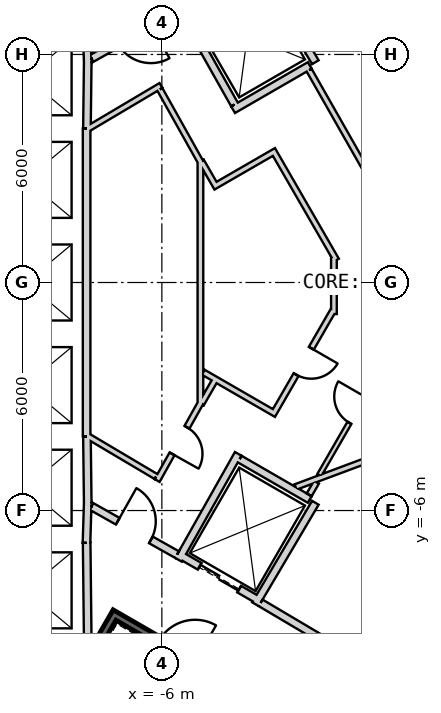
"""IFC4 building model, lengths in metres.
Left out: names, types, materials, properties, quantities, classifications, styles, units other than length and angle.
Written with IfcOpenShell. Run it as: python <this file> out.ifc"""

import sys

from ifc_helpers import new_model, si_unit, direction, frame, frame_2d, origin, place, context, subcontext, project, spatial, rectangle, extrude, element, fill, save


model = new_model("IFC4")
c1 = context("Model", 3, precision=1e-05, world=origin(), true_north=direction((0.0, 1.0)))
c2 = subcontext(c1, "Body", "Model", "MODEL_VIEW")
j1 = project(units=[si_unit("LENGTHUNIT", "METRE"), si_unit("PLANEANGLEUNIT", "RADIAN")], contexts=[c1])
p1 = place(None, origin())
s1 = spatial("IfcSite", under=j1, at=p1, CompositionType="ELEMENT")
p2 = place(p1, origin())
s2 = spatial("IfcBuilding", under=s1, at=p2, CompositionType="ELEMENT")
p3 = place(p2, frame((0.0, 0.0, 357.2)))
s3 = spatial("IfcBuildingStorey", under=s2, at=p3, CompositionType="ELEMENT", Elevation=357.2)
p4 = place(p3, frame((19.475, 2.208, 0.0), z_axis=(0.0, 0.0, 1.0), x_axis=(-0.866028369851, 0.499994862586, 0.0)))
e1 = element("IfcWall", 1, at=p4, inside=s3, PredefinedType="SHEAR", context=c2, shape_type="SweptSolid", body=[
    extrude(rectangle(XDim=31.523, YDim=0.9, at=frame_2d((15.762, 0.0))), origin(), (0.0, 0.0, 1.0), 3.9),
])
p5 = place(p4, frame((7.062, 0.0, 0.0)))
e2 = element("IfcOpeningElement", 2, at=p5, cuts=e1, PredefinedType="OPENING", context=c2, shape_type="SweptSolid", body=[
    extrude(rectangle(XDim=1.2, YDim=2.4, at=frame_2d((0.6, 1.2))), frame((0.0, 0.46, 0.0), z_axis=(0.0, -1.0, 0.0), x_axis=(1.0, 0.0, 0.0)), (0.0, 0.0, 1.0), 0.92),
])
p6 = place(p4, frame((3.612, 0.0, 0.0)))
e3 = element("IfcOpeningElement", 3, at=p6, cuts=e1, PredefinedType="OPENING", context=c2, shape_type="SweptSolid", body=[
    extrude(rectangle(XDim=1.2, YDim=2.4, at=frame_2d((0.6, 1.2))), frame((0.0, 0.46, 0.0), z_axis=(0.0, -1.0, 0.0), x_axis=(1.0, 0.0, 0.0)), (0.0, 0.0, 1.0), 0.92),
])
p7 = place(p4, frame((26.712, 0.0, 0.0)))
e4 = element("IfcOpeningElement", 4, at=p7, cuts=e1, PredefinedType="OPENING", context=c2, shape_type="SweptSolid", body=[
    extrude(rectangle(XDim=1.2, YDim=2.4, at=frame_2d((0.6, 1.2))), frame((0.0, 0.46, 0.0), z_axis=(0.0, -1.0, 0.0), x_axis=(1.0, 0.0, 0.0)), (0.0, 0.0, 1.0), 0.92),
])
p8 = place(p3, frame((-7.825, -17.97, 0.0), z_axis=(0.0, 0.0, 1.0), x_axis=(0.866028369851, 0.499994862586, 0.0)))
e5 = element("IfcWall", 5, at=p8, inside=s3, PredefinedType="SHEAR", context=c2, shape_type="SweptSolid", body=[
    extrude(rectangle(XDim=31.523, YDim=0.9, at=frame_2d((15.762, 0.0))), origin(), (0.0, 0.0, 1.0), 3.9),
])
p9 = place(p8, frame((17.862, 0.0, 0.0)))
e6 = element("IfcOpeningElement", 6, at=p9, cuts=e5, PredefinedType="OPENING", context=c2, shape_type="SweptSolid", body=[
    extrude(rectangle(XDim=1.2, YDim=2.4, at=frame_2d((0.6, 1.2))), frame((0.0, 0.46, 0.0), z_axis=(0.0, -1.0, 0.0), x_axis=(1.0, 0.0, 0.0)), (0.0, 0.0, 1.0), 0.92),
])
p10 = place(p8, frame((20.562, 0.0, 0.0)))
e7 = element("IfcOpeningElement", 7, at=p10, cuts=e5, PredefinedType="OPENING", context=c2, shape_type="SweptSolid", body=[
    extrude(rectangle(XDim=1.2, YDim=2.4, at=frame_2d((0.6, 1.2))), frame((0.0, 0.46, 0.0), z_axis=(0.0, -1.0, 0.0), x_axis=(1.0, 0.0, 0.0)), (0.0, 0.0, 1.0), 0.92),
])
p11 = place(p8, frame((26.712, 0.0, 0.0)))
e8 = element("IfcOpeningElement", 8, at=p11, cuts=e5, PredefinedType="OPENING", context=c2, shape_type="SweptSolid", body=[
    extrude(rectangle(XDim=1.2, YDim=2.4, at=frame_2d((0.6, 1.2))), frame((0.0, 0.46, 0.0), z_axis=(0.0, -1.0, 0.0), x_axis=(1.0, 0.0, 0.0)), (0.0, 0.0, 1.0), 0.92),
])
p12 = place(p8, frame((3.612, 0.0, 0.0)))
e9 = element("IfcOpeningElement", 9, at=p12, cuts=e5, PredefinedType="OPENING", context=c2, shape_type="SweptSolid", body=[
    extrude(rectangle(XDim=1.2, YDim=2.4, at=frame_2d((0.6, 1.2))), frame((0.0, 0.46, 0.0), z_axis=(0.0, -1.0, 0.0), x_axis=(1.0, 0.0, 0.0)), (0.0, 0.0, 1.0), 0.92),
])
p13 = place(p3, frame((-7.977, 6.65, 0.0), z_axis=(0.0, 0.0, 1.0), x_axis=(0.030861509705, -0.999523670164, 0.0)))
e10 = element("IfcWall", 10, at=p13, inside=s3, PredefinedType="PLUMBINGWALL", context=c2, shape_type="SweptSolid", body=[
    extrude(rectangle(XDim=0.878, YDim=0.2, at=frame_2d((0.439, 0.0))), origin(), (0.0, 0.0, 1.0), 3.6),
])
p14 = place(p3, frame((-7.949, 5.895, 0.0), z_axis=(0.0, 0.0, 1.0), x_axis=(-0.012042535896, -0.999927486035, 0.0)))
e11 = element("IfcWall", 11, at=p14, inside=s3, PredefinedType="PLUMBINGWALL", context=c2, shape_type="SweptSolid", body=[
    extrude(rectangle(XDim=1.845, YDim=0.2, at=frame_2d((0.922, 0.0))), origin(), (0.0, 0.0, 1.0), 3.6),
])
p15 = place(p3, frame((-7.98, 4.05, 0.0), z_axis=(0.0, 0.0, 1.0), x_axis=(0.0, -1.0, 0.0)))
e12 = element("IfcWall", 12, at=p15, inside=s3, PredefinedType="PLUMBINGWALL", context=c2, shape_type="SweptSolid", body=[
    extrude(rectangle(XDim=8.1, YDim=0.2, at=frame_2d((4.05, 0.0))), origin(), (0.0, 0.0, 1.0), 3.6),
])
p16 = place(p3, frame((-7.95, -5.772, 0.0), z_axis=(0.0, 0.0, 1.0), x_axis=(-0.030803413295, -0.999525462272, 0.0)))
e13 = element("IfcWall", 13, at=p16, inside=s3, PredefinedType="PLUMBINGWALL", context=c2, shape_type="SweptSolid", body=[
    extrude(rectangle(XDim=1.078, YDim=0.2, at=frame_2d((0.539, 0.0))), origin(), (0.0, 0.0, 1.0), 3.6),
])
p17 = place(p3, frame((-7.971, -4.05, 0.0), z_axis=(0.0, 0.0, 1.0), x_axis=(0.012042535896, -0.999927486035, 0.0)))
e14 = element("IfcWall", 14, at=p17, inside=s3, PredefinedType="PLUMBINGWALL", context=c2, shape_type="SweptSolid", body=[
    extrude(rectangle(XDim=1.845, YDim=0.2, at=frame_2d((0.922, 0.0))), origin(), (0.0, 0.0, 1.0), 3.6),
])
p18 = place(p3, frame((-7.979, -6.85, 0.0), z_axis=(0.0, 0.0, 1.0), x_axis=(0.011121475088, -0.999938154483, 0.0)))
e15 = element("IfcWall", 15, at=p18, inside=s3, PredefinedType="PLUMBINGWALL", context=c2, shape_type="SweptSolid", body=[
    extrude(rectangle(XDim=2.7, YDim=0.2, at=frame_2d((1.35, 0.0))), origin(), (0.0, 0.0, 1.0), 3.6),
])
p19 = place(p3, frame((-3.538, 8.465, 0.0), z_axis=(0.0, 0.0, 1.0), x_axis=(0.508647062354, -0.860975125052, 0.0)))
e16 = element("IfcWall", 16, at=p19, inside=s3, PredefinedType="PLUMBINGWALL", context=c2, shape_type="SweptSolid", body=[
    extrude(rectangle(XDim=3.1, YDim=0.2, at=frame_2d((1.55, 0.0))), origin(), (0.0, 0.0, 1.0), 3.6),
])
p20 = place(p3, frame((-1.979, 5.786, 0.0), z_axis=(0.0, 0.0, 1.0), x_axis=(-0.866016689309, -0.500015093611, 0.0)))
e17 = element("IfcWall", 17, at=p20, inside=s3, PredefinedType="PLUMBINGWALL", context=c2, shape_type="SweptSolid", body=[
    extrude(rectangle(XDim=2.479, YDim=0.2, at=frame_2d((1.24, 0.0))), origin(), (0.0, 0.0, 1.0), 3.6),
])
p21 = place(p3, frame((-5.562, 7.296, 0.0), z_axis=(0.0, 0.0, 1.0), x_axis=(0.49134651263, -0.870964180966, 0.0)))
e18 = element("IfcWall", 18, at=p21, inside=s3, PredefinedType="PLUMBINGWALL", context=c2, shape_type="SweptSolid", body=[
    extrude(rectangle(XDim=3.0, YDim=0.2, at=frame_2d((1.5, 0.0))), origin(), (0.0, 0.0, 1.0), 3.6),
])
p22 = place(p3, frame((-7.196, -8.663, -0.3), z_axis=(0.0, 0.0, 1.0), x_axis=(-0.499997992926, -0.866026562566, 0.0)))
e19 = element("IfcWall", 19, at=p22, inside=s3, PredefinedType="SHEAR", context=c2, shape_type="SweptSolid", body=[
    extrude(rectangle(XDim=7.9, YDim=0.2, at=frame_2d((3.95, 0.0))), origin(), (0.0, 0.0, 1.0), 3.9),
])
p23 = place(p3, frame((-4.041, -10.599, -0.3), z_axis=(0.0, 0.0, 1.0), x_axis=(-0.866047807691, 0.499961193289, 0.0)))
e20 = element("IfcWall", 20, at=p23, inside=s3, PredefinedType="SHEAR", context=c2, shape_type="SweptSolid", body=[
    extrude(rectangle(XDim=3.6, YDim=0.2, at=frame_2d((1.8, 0.0))), origin(), (0.0, 0.0, 1.0), 3.9),
])
p24 = place(p23, frame((1.25, 0.0, 0.3)))
e21 = element("IfcOpeningElement", 21, at=p24, cuts=e20, PredefinedType="OPENING", context=c2, shape_type="SweptSolid", body=[
    extrude(rectangle(XDim=1.1, YDim=2.1, at=frame_2d((0.55, 1.05))), frame((0.0, 0.11, 0.0), z_axis=(0.0, -1.0, 0.0), x_axis=(1.0, 0.0, 0.0)), (0.0, 0.0, 1.0), 0.22),
])
p25 = place(p3, frame((-3.446, -8.368, 0.0), z_axis=(0.0, 0.0, 1.0), x_axis=(-0.866024647952, 0.500001309137, 0.0)))
e22 = element("IfcWall", 22, at=p25, inside=s3, PredefinedType="PLUMBINGWALL", context=c2, shape_type="SweptSolid", body=[
    extrude(rectangle(XDim=2.4, YDim=0.2, at=frame_2d((1.2, 0.0))), origin(), (0.0, 0.0, 1.0), 3.6),
])
p26 = place(p25, frame((0.6, 0.0, 0.0)))
e23 = element("IfcOpeningElement", 23, at=p26, cuts=e22, PredefinedType="OPENING", context=c2, shape_type="SweptSolid", body=[
    extrude(rectangle(XDim=1.2, YDim=2.4, at=frame_2d((0.6, 1.2))), frame((0.0, 0.11, 0.0), z_axis=(0.0, -1.0, 0.0), x_axis=(1.0, 0.0, 0.0)), (0.0, 0.0, 1.0), 0.22),
])
p27 = place(p3, frame((-1.961, -5.796, 0.0), z_axis=(0.0, 0.0, 1.0), x_axis=(-0.508647062354, -0.860975125052, 0.0)))
e24 = element("IfcWall", 24, at=p27, inside=s3, PredefinedType="PLUMBINGWALL", context=c2, shape_type="SweptSolid", body=[
    extrude(rectangle(XDim=3.1, YDim=0.2, at=frame_2d((1.55, 0.0))), origin(), (0.0, 0.0, 1.0), 3.6),
])
p28 = place(p3, frame((-3.99, -4.509, 0.0), z_axis=(0.0, 0.0, 1.0), x_axis=(-0.491358283181, -0.870957540612, 0.0)))
e25 = element("IfcWall", 25, at=p28, inside=s3, PredefinedType="PLUMBINGWALL", context=c2, shape_type="SweptSolid", body=[
    extrude(rectangle(XDim=3.2, YDim=0.2, at=frame_2d((1.6, 0.0))), origin(), (0.0, 0.0, 1.0), 3.6),
])
p29 = place(p3, frame((-3.953, -4.646, 0.0), z_axis=(0.0, 0.0, 1.0), x_axis=(0.866065302921, -0.4999308863, 0.0)))
e26 = element("IfcWall", 26, at=p29, inside=s3, PredefinedType="PLUMBINGWALL", context=c2, shape_type="SweptSolid", body=[
    extrude(rectangle(XDim=2.264, YDim=0.2, at=frame_2d((1.132, 0.0))), origin(), (0.0, 0.0, 1.0), 3.6),
])
p30 = place(p3, frame((-1.023, -9.772, 0.0), z_axis=(0.0, 0.0, 1.0), x_axis=(0.874290944206, 0.485402250592, 0.0)))
e27 = element("IfcWall", 27, at=p30, inside=s3, PredefinedType="PARTITIONING", context=c2, shape_type="SweptSolid", body=[
    extrude(rectangle(XDim=1.723, YDim=0.12, at=frame_2d((0.861, 0.0))), origin(), (0.0, 0.0, 1.0), 3.6),
])
p31 = place(p3, frame((-5.6, 7.16, 0.0), z_axis=(0.0, 0.0, 1.0), x_axis=(-0.871363259478, -0.490638431059, 0.0)))
e28 = element("IfcWall", 28, at=p31, inside=s3, PredefinedType="PARTITIONING", context=c2, shape_type="SweptSolid", body=[
    extrude(rectangle(XDim=2.581, YDim=0.2, at=frame_2d((1.291, 0.0))), origin(), (0.0, 0.0, 1.0), 3.6),
])
p32 = place(p31, frame((0.791, 0.0, 0.0)))
e29 = element("IfcOpeningElement", 29, at=p32, cuts=e28, PredefinedType="OPENING", context=c2, shape_type="SweptSolid", body=[
    extrude(rectangle(XDim=1.0, YDim=2.1, at=frame_2d((0.5, 1.05))), frame((0.0, 0.11, 0.0), z_axis=(0.0, -1.0, 0.0), x_axis=(1.0, 0.0, 0.0)), (0.0, 0.0, 1.0), 0.22),
])
p33 = place(p3, frame((-3.401, -8.43, 0.0), z_axis=(0.0, 0.0, 1.0), x_axis=(0.860630814782, -0.509229418482, 0.0)))
e30 = element("IfcWall", 30, at=p33, inside=s3, PredefinedType="PARTITIONING", context=c2, shape_type="SweptSolid", body=[
    extrude(rectangle(XDim=2.582, YDim=0.2, at=frame_2d((1.291, 0.0))), origin(), (0.0, 0.0, 1.0), 3.6),
])
p34 = place(p3, frame((-7.849, -5.894, 0.0), z_axis=(0.0, 0.0, 1.0), x_axis=(0.871363259478, -0.490638431059, 0.0)))
e31 = element("IfcWall", 31, at=p34, inside=s3, PredefinedType="PARTITIONING", context=c2, shape_type="SweptSolid", body=[
    extrude(rectangle(XDim=2.581, YDim=0.2, at=frame_2d((1.291, 0.0))), origin(), (0.0, 0.0, 1.0), 3.6),
])
p35 = place(p34, frame((0.791, 0.0, 0.0)))
e32 = element("IfcOpeningElement", 32, at=p35, cuts=e31, PredefinedType="OPENING", context=c2, shape_type="SweptSolid", body=[
    extrude(rectangle(XDim=1.0, YDim=2.1, at=frame_2d((0.5, 1.05))), frame((0.0, 0.11, 0.0), z_axis=(0.0, -1.0, 0.0), x_axis=(1.0, 0.0, 0.0)), (0.0, 0.0, 1.0), 0.22),
])
p36 = place(p3, frame((-1.994, 5.661, 0.0), z_axis=(0.0, 0.0, 1.0), x_axis=(0.494341211302, -0.869267948798, 0.0)))
e33 = element("IfcWall", 33, at=p36, inside=s3, PredefinedType="PLUMBINGWALL", context=c2, shape_type="SweptSolid", body=[
    extrude(rectangle(XDim=4.361, YDim=0.15, at=frame_2d((2.18, 0.0))), origin(), (0.0, 0.0, 1.0), 3.6),
])
p37 = place(p3, frame((0.224, -1.761, 0.0), z_axis=(0.0, 0.0, 1.0), x_axis=(-0.494327216836, -0.869275907118, 0.0)))
e34 = element("IfcWall", 34, at=p37, inside=s3, PredefinedType="PARTITIONING", context=c2, shape_type="SweptSolid", body=[
    extrude(rectangle(XDim=4.487, YDim=0.12, at=frame_2d((2.244, 0.0))), origin(), (0.0, 0.0, 1.0), 3.6),
])
p38 = place(p37, frame((1.895, 0.0, 0.0)))
e35 = element("IfcOpeningElement", 35, at=p38, cuts=e34, PredefinedType="OPENING", context=c2, shape_type="SweptSolid", body=[
    extrude(rectangle(XDim=0.8, YDim=2.1, at=frame_2d((0.4, 1.05))), frame((0.0, 0.07, 0.0), z_axis=(0.0, -1.0, 0.0), x_axis=(1.0, 0.0, 0.0)), (0.0, 0.0, 1.0), 0.14),
])
p39 = place(p3, frame((-6.037, 5.176, 0.0), z_axis=(0.0, 0.0, 1.0), x_axis=(-0.860106072674, -0.510115225953, 0.0)))
e36 = element("IfcWall", 36, at=p39, inside=s3, PredefinedType="PARTITIONING", context=c2, shape_type="SweptSolid", body=[
    extrude(rectangle(XDim=2.225, YDim=0.12, at=frame_2d((1.112, 0.0))), origin(), (0.0, 0.0, 1.0), 3.6),
])
p40 = place(p3, frame((-4.558, 2.495, 0.0), z_axis=(0.0, 0.0, 1.0), x_axis=(-0.499990139034, 0.866031096941, 0.0)))
e37 = element("IfcWall", 37, at=p40, inside=s3, PredefinedType="PARTITIONING", context=c2, shape_type="SweptSolid", body=[
    extrude(rectangle(XDim=3.0, YDim=0.12, at=frame_2d((1.5, 0.0))), origin(), (0.0, 0.0, 1.0), 3.6),
])
p41 = place(p3, frame((-3.129, 3.39, 0.0), z_axis=(0.0, 0.0, 1.0), x_axis=(-0.866053003207, -0.499952193351, 0.0)))
e38 = element("IfcWall", 38, at=p41, inside=s3, PredefinedType="PARTITIONING", context=c2, shape_type="SweptSolid", body=[
    extrude(rectangle(XDim=1.625, YDim=0.12, at=frame_2d((0.812, 0.0))), origin(), (0.0, 0.0, 1.0), 3.6),
])
p42 = place(p3, frame((-1.637, 0.685, 0.0), z_axis=(0.0, 0.0, 1.0), x_axis=(-0.500006252586, 0.866021793822, 0.0)))
e39 = element("IfcWall", 39, at=p42, inside=s3, PredefinedType="PARTITIONING", context=c2, shape_type="SweptSolid", body=[
    extrude(rectangle(XDim=3.028, YDim=0.12, at=frame_2d((1.514, 0.0))), origin(), (0.0, 0.0, 1.0), 3.6),
])
p43 = place(p3, frame((-1.689, -0.879, 0.0), z_axis=(0.0, 0.0, 1.0), x_axis=(0.0, 1.0, 0.0)))
e40 = element("IfcWall", 40, at=p43, inside=s3, PredefinedType="PARTITIONING", context=c2, shape_type="SweptSolid", body=[
    extrude(rectangle(XDim=1.635, YDim=0.12, at=frame_2d((0.818, 0.0))), origin(), (0.0, 0.0, 1.0), 3.6),
])
p44 = place(p3, frame((-3.211, -3.412, 0.0), z_axis=(0.0, 0.0, 1.0), x_axis=(0.499983190554, 0.866035108505, 0.0)))
e41 = element("IfcWall", 41, at=p44, inside=s3, PredefinedType="PARTITIONING", context=c2, shape_type="SweptSolid", body=[
    extrude(rectangle(XDim=3.026, YDim=0.12, at=frame_2d((1.513, 0.0))), origin(), (0.0, 0.0, 1.0), 3.6),
])
p45 = place(p44, frame((1.143, 0.0, 0.0)))
e42 = element("IfcOpeningElement", 42, at=p45, cuts=e41, PredefinedType="OPENING", context=c2, shape_type="SweptSolid", body=[
    extrude(rectangle(XDim=0.8, YDim=2.1, at=frame_2d((0.4, 1.05))), frame((0.0, 0.07, 0.0), z_axis=(0.0, -1.0, 0.0), x_axis=(1.0, 0.0, 0.0)), (0.0, 0.0, 1.0), 0.14),
])
p46 = place(p3, frame((-4.64, -2.517, 0.0), z_axis=(0.0, 0.0, 1.0), x_axis=(0.866015446554, -0.500017246033, 0.0)))
e43 = element("IfcWall", 43, at=p46, inside=s3, PredefinedType="PARTITIONING", context=c2, shape_type="SweptSolid", body=[
    extrude(rectangle(XDim=1.625, YDim=0.12, at=frame_2d((0.812, 0.0))), origin(), (0.0, 0.0, 1.0), 3.6),
])
p47 = place(p3, frame((-6.118, -5.197, 0.0), z_axis=(0.0, 0.0, 1.0), x_axis=(0.499990139034, 0.866031096941, 0.0)))
e44 = element("IfcWall", 44, at=p47, inside=s3, PredefinedType="PARTITIONING", context=c2, shape_type="SweptSolid", body=[
    extrude(rectangle(XDim=3.0, YDim=0.12, at=frame_2d((1.5, 0.0))), origin(), (0.0, 0.0, 1.0), 3.6),
])
p48 = place(p3, frame((-7.95, -4.041, 0.0), z_axis=(0.0, 0.0, 1.0), x_axis=(0.860112457103, -0.510104461004, 0.0)))
e45 = element("IfcWall", 45, at=p48, inside=s3, PredefinedType="PARTITIONING", context=c2, shape_type="SweptSolid", body=[
    extrude(rectangle(XDim=2.104, YDim=0.12, at=frame_2d((1.052, 0.0))), origin(), (0.0, 0.0, 1.0), 3.6),
])
p49 = place(p35, origin())
e46 = element("IfcDoor", 46, at=p49, inside=s3, OperationType="SINGLE_SWING_LEFT", PredefinedType="USERDEFINED", context=c2, shape_type="SweptSolid", body=[
    extrude(rectangle(XDim=1.0, YDim=2.1, at=frame_2d((0.5, 1.05))), frame((0.0, 0.025, 0.0), z_axis=(0.0, -1.0, 0.0), x_axis=(1.0, 0.0, 0.0)), (0.0, 0.0, 1.0), 0.05),
])
fill(e32, e46)
p50 = place(p26, origin())
e47 = element("IfcDoor", 47, at=p50, inside=s3, OperationType="SLIDING_TO_LEFT", PredefinedType="USERDEFINED", context=c2, shape_type="SweptSolid", body=[
    extrude(rectangle(XDim=1.2, YDim=2.4, at=frame_2d((0.6, 1.2))), frame((0.0, 0.025, 0.0), z_axis=(0.0, -1.0, 0.0), x_axis=(1.0, 0.0, 0.0)), (0.0, 0.0, 1.0), 0.05),
])
fill(e23, e47)
p51 = place(p38, origin())
e48 = element("IfcDoor", 48, at=p51, inside=s3, OperationType="SINGLE_SWING_LEFT", PredefinedType="USERDEFINED", context=c2, shape_type="SweptSolid", body=[
    extrude(rectangle(XDim=0.8, YDim=2.1, at=frame_2d((0.4, 1.05))), frame((0.0, 0.025, 0.0), z_axis=(0.0, -1.0, 0.0), x_axis=(1.0, 0.0, 0.0)), (0.0, 0.0, 1.0), 0.05),
])
fill(e35, e48)
p52 = place(p45, origin())
e49 = element("IfcDoor", 49, at=p52, inside=s3, OperationType="SINGLE_SWING_RIGHT", PredefinedType="USERDEFINED", context=c2, shape_type="SweptSolid", body=[
    extrude(rectangle(XDim=0.8, YDim=2.1, at=frame_2d((0.4, 1.05))), frame((0.0, 0.025, 0.0), z_axis=(0.0, -1.0, 0.0), x_axis=(1.0, 0.0, 0.0)), (0.0, 0.0, 1.0), 0.05),
])
fill(e42, e49)
save(model, sys.argv[1])
